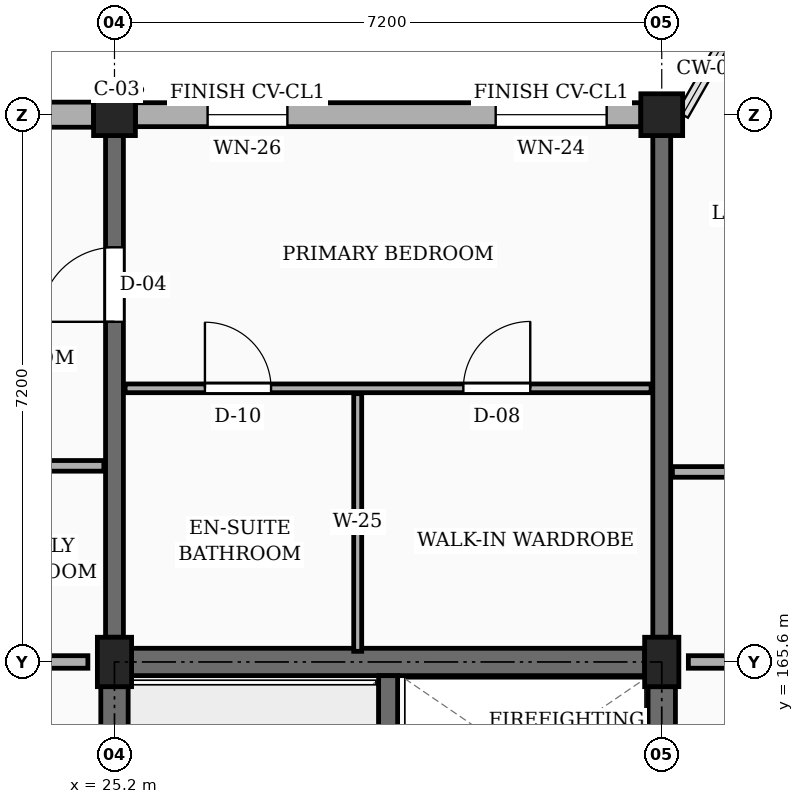
"""IFC4 building model, lengths in metres.
Left out: names, types, materials, properties, quantities, classifications, styles, units other than length and angle.
Written with IfcOpenShell. Run it as: python <this file> out.ifc"""

import sys

from ifc_helpers import new_model, si_unit, direction, frame, frame_2d, origin, origin_2d, place, context, subcontext, project, spatial, rectangle, extrude, element, fill, save


model = new_model("IFC4")
c1 = context("Model", 3, precision=1e-05, world=origin(), true_north=direction((0.0, 1.0)))
c2 = subcontext(c1, "Body", "Model", "MODEL_VIEW")
j1 = project(units=[si_unit("LENGTHUNIT", "METRE"), si_unit("PLANEANGLEUNIT", "RADIAN")], contexts=[c1])
p1 = place(None, origin())
s1 = spatial("IfcSite", under=j1, at=p1, CompositionType="ELEMENT")
p2 = place(p1, origin())
s2 = spatial("IfcBuilding", under=s1, at=p2, CompositionType="ELEMENT")
p3 = place(p2, frame((0.0, 0.0, 20.25)))
s3 = spatial("IfcBuildingStorey", under=s2, at=p3, CompositionType="ELEMENT", Elevation=20.25)
p4 = place(p3, frame((25.2, 165.6, 0.0), z_axis=(0.0, 0.0, 1.0), x_axis=(1.0, 0.0, 0.0)))
e1 = element("IfcColumn", 1, at=p4, inside=s3, PredefinedType="COLUMN", context=c2, shape_type="SweptSolid", body=[
    extrude(rectangle(XDim=0.45, YDim=0.65, at=origin_2d()), origin(), (0.0, 0.0, 1.0), 3.15),
])
p5 = place(p3, frame((25.2, 172.8, 0.0), z_axis=(0.0, 0.0, 1.0), x_axis=(1.0, 0.0, 0.0)))
e2 = element("IfcColumn", 2, at=p5, inside=s3, PredefinedType="COLUMN", context=c2, shape_type="SweptSolid", body=[
    extrude(rectangle(XDim=0.55, YDim=0.55, at=origin_2d()), origin(), (0.0, 0.0, 1.0), 3.15),
])
p6 = place(p3, frame((32.4, 165.6, 0.0), z_axis=(0.0, 0.0, 1.0), x_axis=(1.0, 0.0, 0.0)))
e3 = element("IfcColumn", 3, at=p6, inside=s3, PredefinedType="COLUMN", context=c2, shape_type="SweptSolid", body=[
    extrude(rectangle(XDim=0.45, YDim=0.65, at=origin_2d()), origin(), (0.0, 0.0, 1.0), 3.15),
])
p7 = place(p3, frame((32.4, 172.8, 0.0), z_axis=(0.0, 0.0, 1.0), x_axis=(1.0, 0.0, 0.0)))
e4 = element("IfcColumn", 4, at=p7, inside=s3, PredefinedType="COLUMN", context=c2, shape_type="SweptSolid", body=[
    extrude(rectangle(XDim=0.55, YDim=0.55, at=origin_2d()), origin(), (0.0, 0.0, 1.0), 3.15),
])
p8 = place(p3, frame((25.2, 165.925, 0.0), z_axis=(0.0, 0.0, 1.0), x_axis=(0.0, 1.0, 0.0)))
e5 = element("IfcWall", 5, at=p8, inside=s3, PredefinedType="SOLIDWALL", context=c2, shape_type="SweptSolid", body=[
    extrude(rectangle(XDim=6.6, YDim=0.235, at=frame_2d((3.3, 0.0))), origin(), (0.0, 0.0, 1.0), 2.185),
])
p9 = place(p8, frame((4.15, 0.0, 0.0)))
e6 = element("IfcOpeningElement", 6, at=p9, cuts=e5, PredefinedType="OPENING", context=c2, shape_type="SweptSolid", body=[
    extrude(rectangle(XDim=0.98, YDim=2.12, at=frame_2d((0.49, 1.06))), frame((0.0, 0.127, 0.0), z_axis=(0.0, -1.0, 0.0), x_axis=(1.0, 0.0, 0.0)), (0.0, 0.0, 1.0), 0.255),
])
p10 = place(p3, frame((32.4, 165.925, 0.0), z_axis=(0.0, 0.0, 1.0), x_axis=(0.0, 1.0, 0.0)))
e7 = element("IfcWall", 7, at=p10, inside=s3, PredefinedType="SOLIDWALL", context=c2, shape_type="SweptSolid", body=[
    extrude(rectangle(XDim=6.6, YDim=0.235, at=frame_2d((3.3, 0.0))), origin(), (0.0, 0.0, 1.0), 2.185),
])
p11 = place(p3, frame((32.125, 172.8, 0.0), z_axis=(0.0, 0.0, 1.0), x_axis=(-1.0, 0.0, 0.0)))
e8 = element("IfcWall", 8, at=p11, inside=s3, PredefinedType="SOLIDWALL", context=c2, shape_type="SweptSolid", body=[
    extrude(rectangle(XDim=6.65, YDim=0.315, at=frame_2d((3.325, 0.0))), origin(), (0.0, 0.0, 1.0), 2.455),
])
p12 = place(p11, frame((0.45, 0.0, 0.78)))
e9 = element("IfcOpeningElement", 9, at=p12, cuts=e8, PredefinedType="OPENING", context=c2, shape_type="SweptSolid", body=[
    extrude(rectangle(XDim=1.46, YDim=1.36, at=frame_2d((0.73, 0.68))), frame((0.0, 0.167, 0.0), z_axis=(0.0, -1.0, 0.0), x_axis=(1.0, 0.0, 0.0)), (0.0, 0.0, 1.0), 0.335),
])
p13 = place(p11, frame((4.65, 0.0, 0.78)))
e10 = element("IfcOpeningElement", 10, at=p13, cuts=e8, PredefinedType="OPENING", context=c2, shape_type="SweptSolid", body=[
    extrude(rectangle(XDim=1.05, YDim=1.44, at=frame_2d((0.525, 0.72))), frame((0.0, 0.167, 0.0), z_axis=(0.0, -1.0, 0.0), x_axis=(1.0, 0.0, 0.0)), (0.0, 0.0, 1.0), 0.335),
])
p14 = place(p3, frame((24.925, 172.8, 0.0), z_axis=(0.0, 0.0, 1.0), x_axis=(-1.0, 0.0, 0.0)))
e11 = element("IfcWall", 11, at=p14, inside=s3, PredefinedType="SOLIDWALL", context=c2, shape_type="SweptSolid", body=[
    extrude(rectangle(XDim=3.905, YDim=0.33, at=frame_2d((1.953, 0.0))), origin(), (0.0, 0.0, 1.0), 2.455),
])
p15 = place(p14, frame((1.133, 0.0, 0.78)))
e12 = element("IfcOpeningElement", 12, at=p15, cuts=e11, PredefinedType="OPENING", context=c2, shape_type="SweptSolid", body=[
    extrude(rectangle(XDim=1.05, YDim=1.44, at=frame_2d((0.525, 0.72))), frame((0.0, 0.175, 0.0), z_axis=(0.0, -1.0, 0.0), x_axis=(1.0, 0.0, 0.0)), (0.0, 0.0, 1.0), 0.35),
])
p16 = place(p3, frame((25.2, 158.725, 0.0), z_axis=(0.0, 0.0, 1.0), x_axis=(0.0, 1.0, 0.0)))
e13 = element("IfcWall", 13, at=p16, inside=s3, PredefinedType="SHEAR", context=c2, shape_type="SweptSolid", body=[
    extrude(rectangle(XDim=6.55, YDim=0.36, at=frame_2d((3.275, 0.0))), origin(), (0.0, 0.0, 1.0), 2.885),
])
p17 = place(p3, frame((25.425, 165.6, 0.0), z_axis=(0.0, 0.0, 1.0), x_axis=(1.0, 0.0, 0.0)))
e14 = element("IfcWall", 14, at=p17, inside=s3, PredefinedType="SHEAR", context=c2, shape_type="SweptSolid", body=[
    extrude(rectangle(XDim=6.75, YDim=0.36, at=frame_2d((3.375, 0.0))), origin(), (0.0, 0.0, 1.0), 2.885),
])
p18 = place(p3, frame((32.4, 158.725, 0.0), z_axis=(0.0, 0.0, 1.0), x_axis=(0.0, 1.0, 0.0)))
e15 = element("IfcWall", 15, at=p18, inside=s3, PredefinedType="SHEAR", context=c2, shape_type="SweptSolid", body=[
    extrude(rectangle(XDim=6.55, YDim=0.36, at=frame_2d((3.275, 0.0))), origin(), (0.0, 0.0, 1.0), 2.885),
])
p19 = place(p3, frame((28.8, 158.58, 0.0), z_axis=(0.0, 0.0, 1.0), x_axis=(0.0, 1.0, 0.0)))
e16 = element("IfcWall", 16, at=p19, inside=s3, PredefinedType="SHEAR", context=c2, shape_type="SweptSolid", body=[
    extrude(rectangle(XDim=6.84, YDim=0.25, at=frame_2d((3.42, 0.0))), origin(), (0.0, 0.0, 1.0), 2.885),
])
p20 = place(p19, frame((0.42, 0.0, 0.0)))
e17 = element("IfcOpeningElement", 17, at=p20, cuts=e16, PredefinedType="OPENING", context=c2, shape_type="SweptSolid", body=[
    extrude(rectangle(XDim=1.05, YDim=2.15, at=frame_2d((0.525, 1.075))), frame((0.0, 0.135, 0.0), z_axis=(0.0, -1.0, 0.0), x_axis=(1.0, 0.0, 0.0)), (0.0, 0.0, 1.0), 0.27),
])
p21 = place(p3, frame((18.35, 165.6, 0.0), z_axis=(0.0, 0.0, 1.0), x_axis=(1.0, 0.0, 0.0)))
e18 = element("IfcWall", 18, at=p21, inside=s3, PredefinedType="PARTITIONING", context=c2, shape_type="SweptSolid", body=[
    extrude(rectangle(XDim=6.5, YDim=0.165, at=frame_2d((3.25, 0.0))), origin(), (0.0, 0.0, 1.0), 2.32),
])
p22 = place(p21, frame((1.0, 0.0, 0.0)))
e19 = element("IfcOpeningElement", 19, at=p22, cuts=e18, PredefinedType="OPENING", context=c2, shape_type="SweptSolid", body=[
    extrude(rectangle(XDim=1.14, YDim=2.18, at=frame_2d((0.57, 1.09))), frame((0.0, 0.093, 0.0), z_axis=(0.0, -1.0, 0.0), x_axis=(1.0, 0.0, 0.0)), (0.0, 0.0, 1.0), 0.185),
])
p23 = place(p3, frame((32.75, 165.6, 0.0), z_axis=(0.0, 0.0, 1.0), x_axis=(1.0, 0.0, 0.0)))
e20 = element("IfcWall", 20, at=p23, inside=s3, PredefinedType="PARTITIONING", context=c2, shape_type="SweptSolid", body=[
    extrude(rectangle(XDim=6.5, YDim=0.165, at=frame_2d((3.25, 0.0))), origin(), (0.0, 0.0, 1.0), 2.32),
])
p24 = place(p23, frame((1.0, 0.0, 0.0)))
e21 = element("IfcOpeningElement", 21, at=p24, cuts=e20, PredefinedType="OPENING", context=c2, shape_type="SweptSolid", body=[
    extrude(rectangle(XDim=1.0, YDim=2.15, at=frame_2d((0.5, 1.075))), frame((0.0, 0.093, 0.0), z_axis=(0.0, -1.0, 0.0), x_axis=(1.0, 0.0, 0.0)), (0.0, 0.0, 1.0), 0.185),
])
p25 = place(p3, frame((18.14, 168.18, 0.0), z_axis=(0.0, 0.0, 1.0), x_axis=(1.0, 0.0, 0.0)))
e22 = element("IfcWall", 22, at=p25, inside=s3, PredefinedType="PARTITIONING", context=c2, shape_type="SweptSolid", body=[
    extrude(rectangle(XDim=6.92, YDim=0.14, at=frame_2d((3.46, 0.0))), origin(), (0.0, 0.0, 1.0), 2.32),
])
p26 = place(p25, frame((1.31, 0.0, 0.0)))
e23 = element("IfcOpeningElement", 23, at=p26, cuts=e22, PredefinedType="OPENING", context=c2, shape_type="SweptSolid", body=[
    extrude(rectangle(XDim=0.95, YDim=2.1, at=frame_2d((0.475, 1.05))), frame((0.0, 0.08, 0.0), z_axis=(0.0, -1.0, 0.0), x_axis=(1.0, 0.0, 0.0)), (0.0, 0.0, 1.0), 0.16),
])
p27 = place(p3, frame((25.34, 169.2, 0.0), z_axis=(0.0, 0.0, 1.0), x_axis=(1.0, 0.0, 0.0)))
e24 = element("IfcWall", 24, at=p27, inside=s3, PredefinedType="PARTITIONING", context=c2, shape_type="SweptSolid", body=[
    extrude(rectangle(XDim=6.92, YDim=0.115, at=frame_2d((3.46, 0.0))), origin(), (0.0, 0.0, 1.0), 2.32),
])
p28 = place(p27, frame((1.05, 0.0, 0.0)))
e25 = element("IfcOpeningElement", 25, at=p28, cuts=e24, PredefinedType="OPENING", context=c2, shape_type="SweptSolid", body=[
    extrude(rectangle(XDim=0.87, YDim=2.05, at=frame_2d((0.435, 1.025))), frame((0.0, 0.067, 0.0), z_axis=(0.0, -1.0, 0.0), x_axis=(1.0, 0.0, 0.0)), (0.0, 0.0, 1.0), 0.135),
])
p29 = place(p27, frame((4.45, 0.0, 0.0)))
e26 = element("IfcOpeningElement", 26, at=p29, cuts=e24, PredefinedType="OPENING", context=c2, shape_type="SweptSolid", body=[
    extrude(rectangle(XDim=0.88, YDim=2.08, at=frame_2d((0.44, 1.04))), frame((0.0, 0.067, 0.0), z_axis=(0.0, -1.0, 0.0), x_axis=(1.0, 0.0, 0.0)), (0.0, 0.0, 1.0), 0.135),
])
p30 = place(p3, frame((28.4, 165.74, 0.0), z_axis=(0.0, 0.0, 1.0), x_axis=(0.0, 1.0, 0.0)))
e27 = element("IfcWall", 27, at=p30, inside=s3, PredefinedType="PARTITIONING", context=c2, shape_type="SweptSolid", body=[
    extrude(rectangle(XDim=3.39, YDim=0.105, at=frame_2d((1.695, 0.0))), origin(), (0.0, 0.0, 1.0), 2.32),
])
p31 = place(p3, frame((32.54, 168.1, 0.0), z_axis=(0.0, 0.0, 1.0), x_axis=(1.0, 0.0, 0.0)))
e28 = element("IfcWall", 28, at=p31, inside=s3, PredefinedType="PARTITIONING", context=c2, shape_type="SweptSolid", body=[
    extrude(rectangle(XDim=6.92, YDim=0.14, at=frame_2d((3.46, 0.0))), origin(), (0.0, 0.0, 1.0), 2.32),
])
p32 = place(p31, frame((1.31, 0.0, 0.0)))
e29 = element("IfcOpeningElement", 29, at=p32, cuts=e28, PredefinedType="OPENING", context=c2, shape_type="SweptSolid", body=[
    extrude(rectangle(XDim=0.95, YDim=2.1, at=frame_2d((0.475, 1.05))), frame((0.0, 0.08, 0.0), z_axis=(0.0, -1.0, 0.0), x_axis=(1.0, 0.0, 0.0)), (0.0, 0.0, 1.0), 0.16),
])
p33 = place(p12, origin())
e30 = element("IfcWindow", 30, at=p33, inside=s3, PartitioningType="SINGLE_PANEL", PredefinedType="WINDOW", context=c2, shape_type="SweptSolid", body=[
    extrude(rectangle(XDim=1.46, YDim=1.36, at=frame_2d((0.73, 0.68))), frame((0.0, 0.03, 0.0), z_axis=(0.0, -1.0, 0.0), x_axis=(1.0, 0.0, 0.0)), (0.0, 0.0, 1.0), 0.06),
])
fill(e9, e30)
p34 = place(p13, origin())
e31 = element("IfcWindow", 31, at=p34, inside=s3, PartitioningType="SINGLE_PANEL", PredefinedType="WINDOW", context=c2, shape_type="SweptSolid", body=[
    extrude(rectangle(XDim=1.05, YDim=1.44, at=frame_2d((0.525, 0.72))), frame((0.0, 0.03, 0.0), z_axis=(0.0, -1.0, 0.0), x_axis=(1.0, 0.0, 0.0)), (0.0, 0.0, 1.0), 0.06),
])
fill(e10, e31)
p35 = place(p28, origin())
e32 = element("IfcDoor", 32, at=p35, inside=s3, OperationType="SINGLE_SWING_LEFT", PredefinedType="DOOR", context=c2, shape_type="SweptSolid", body=[
    extrude(rectangle(XDim=0.87, YDim=2.05, at=frame_2d((0.435, 1.025))), frame((0.0, 0.025, 0.0), z_axis=(0.0, -1.0, 0.0), x_axis=(1.0, 0.0, 0.0)), (0.0, 0.0, 1.0), 0.05),
])
fill(e25, e32)
p36 = place(p29, origin())
e33 = element("IfcDoor", 33, at=p36, inside=s3, OperationType="SINGLE_SWING_RIGHT", PredefinedType="DOOR", context=c2, shape_type="SweptSolid", body=[
    extrude(rectangle(XDim=0.88, YDim=2.08, at=frame_2d((0.44, 1.04))), frame((0.0, 0.025, 0.0), z_axis=(0.0, -1.0, 0.0), x_axis=(1.0, 0.0, 0.0)), (0.0, 0.0, 1.0), 0.05),
])
fill(e26, e33)
p37 = place(p9, origin())
e34 = element("IfcDoor", 34, at=p37, inside=s3, OperationType="SINGLE_SWING_LEFT", PredefinedType="DOOR", context=c2, shape_type="SweptSolid", body=[
    extrude(rectangle(XDim=0.98, YDim=2.12, at=frame_2d((0.49, 1.06))), frame((0.0, 0.025, 0.0), z_axis=(0.0, -1.0, 0.0), x_axis=(1.0, 0.0, 0.0)), (0.0, 0.0, 1.0), 0.05),
])
fill(e6, e34)
save(model, sys.argv[1])
